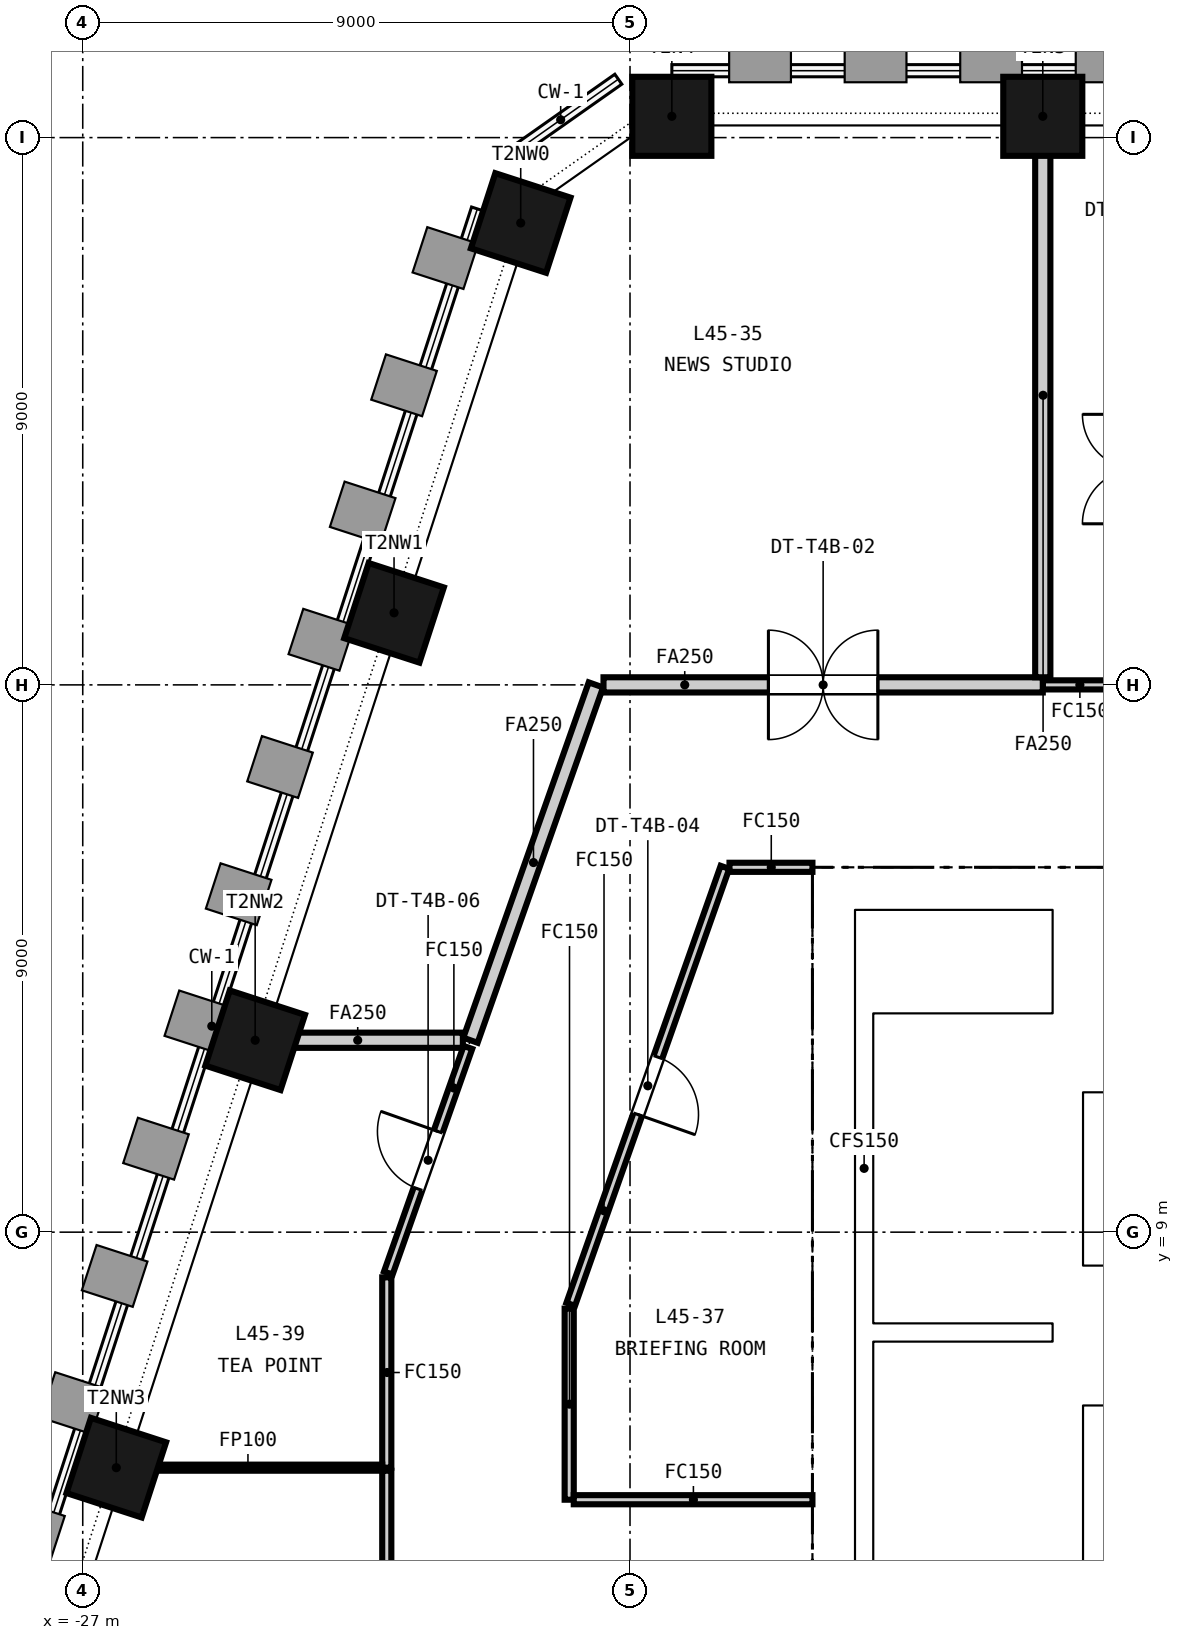
"""IFC4 building model, lengths in metres.
Left out: names, types, materials, properties, quantities, classifications, styles, units other than length and angle.
Written with IfcOpenShell. Run it as: python <this file> out.ifc"""

import sys

from ifc_helpers import new_model, si_unit, direction, frame, frame_2d, origin, origin_2d, place, context, subcontext, project, spatial, rectangle, extrude, element, fill, save


model = new_model("IFC4")
c1 = context("Model", 3, precision=1e-05, world=origin(), true_north=direction((0.0, 1.0)))
c2 = subcontext(c1, "Body", "Model", "MODEL_VIEW")
j1 = project(units=[si_unit("LENGTHUNIT", "METRE"), si_unit("PLANEANGLEUNIT", "RADIAN")], contexts=[c1])
p1 = place(None, origin())
s1 = spatial("IfcSite", under=j1, at=p1, CompositionType="ELEMENT")
p2 = place(p1, origin())
s2 = spatial("IfcBuilding", under=s1, at=p2, CompositionType="ELEMENT")
p3 = place(p2, frame((0.0, 0.0, 181.75)))
s3 = spatial("IfcBuildingStorey", under=s2, at=p3, CompositionType="ELEMENT", Elevation=181.75)
p4 = place(p3, frame((-15.0, 14.65, -0.15), z_axis=(0.0, 0.0, 1.0), x_axis=(1.0, 0.0, 0.0)))
e1 = element("IfcWall", 1, at=p4, inside=s3, PredefinedType="SOLIDWALL", context=c2, shape_type="SweptSolid", body=[
    extrude(rectangle(XDim=30.0, YDim=0.7, at=frame_2d((15.0, 0.0))), origin(), (0.0, 0.0, 1.0), 3.65),
])
p5 = place(p4, frame((9.25, 0.0, 0.15)))
e2 = element("IfcOpeningElement", 2, at=p5, cuts=e1, PredefinedType="OPENING", context=c2, shape_type="SweptSolid", body=[
    extrude(rectangle(XDim=1.5, YDim=2.1, at=frame_2d((0.75, 1.05))), frame((0.0, 0.36, 0.0), z_axis=(0.0, -1.0, 0.0), x_axis=(1.0, 0.0, 0.0)), (0.0, 0.0, 1.0), 0.72),
])
p6 = place(p4, frame((19.4, 0.0, 0.15)))
e3 = element("IfcOpeningElement", 3, at=p6, cuts=e1, PredefinedType="OPENING", context=c2, shape_type="SweptSolid", body=[
    extrude(rectangle(XDim=1.5, YDim=2.1, at=frame_2d((0.75, 1.05))), frame((0.0, 0.36, 0.0), z_axis=(0.0, -1.0, 0.0), x_axis=(1.0, 0.0, 0.0)), (0.0, 0.0, 1.0), 0.72),
])
p7 = place(p4, frame((1.5, 0.0, 0.15)))
e4 = element("IfcOpeningElement", 4, at=p7, cuts=e1, PredefinedType="OPENING", context=c2, shape_type="SweptSolid", body=[
    extrude(rectangle(XDim=1.2, YDim=2.1, at=frame_2d((0.6, 1.05))), frame((0.0, 0.36, 0.0), z_axis=(0.0, -1.0, 0.0), x_axis=(1.0, 0.0, 0.0)), (0.0, 0.0, 1.0), 0.72),
])
p8 = place(p4, frame((27.3, 0.0, 0.15)))
e5 = element("IfcOpeningElement", 5, at=p8, cuts=e1, PredefinedType="OPENING", context=c2, shape_type="SweptSolid", body=[
    extrude(rectangle(XDim=1.2, YDim=2.1, at=frame_2d((0.6, 1.05))), frame((0.0, 0.36, 0.0), z_axis=(0.0, -1.0, 0.0), x_axis=(1.0, 0.0, 0.0)), (0.0, 0.0, 1.0), 0.72),
])
p9 = place(p3, frame((-14.65, 0.7, -0.15), z_axis=(0.0, 0.0, 1.0), x_axis=(0.0, 1.0, 0.0)))
e6 = element("IfcWall", 6, at=p9, inside=s3, PredefinedType="SOLIDWALL", context=c2, shape_type="SweptSolid", body=[
    extrude(rectangle(XDim=13.6, YDim=0.7, at=frame_2d((6.8, 0.0))), origin(), (0.0, 0.0, 1.0), 3.65),
])
p10 = place(p3, frame((-10.8, 0.7, -0.15), z_axis=(0.0, 0.0, 1.0), x_axis=(0.0, 1.0, 0.0)))
e7 = element("IfcWall", 7, at=p10, inside=s3, PredefinedType="SOLIDWALL", context=c2, shape_type="SweptSolid", body=[
    extrude(rectangle(XDim=13.6, YDim=0.5, at=frame_2d((6.8, 0.0))), origin(), (0.0, 0.0, 1.0), 3.65),
])
for number, where, z_axis, x_axis in (
    (8, (-11.212, 27.35, -0.15), (0.0, 0.0, 1.0), (-1.0, 0.0, 0.0)),
    (9, (-17.312, 27.35, -0.15), (0.0, 0.0, 1.0), (-1.0, 0.0, 0.0)),
    (10, (-19.798, 25.596, -0.15), (0.0, 0.0, 1.0), (-0.309, -0.951, 0.0)),
    (11, (-21.881, 19.185, -0.15), (0.0, 0.0, 1.0), (-0.309, -0.951, 0.0)),
    (12, (-24.164, 12.156, -0.15), (0.0, 0.0, 1.0), (-0.309, -0.951, 0.0)),
    (13, (-26.448, 5.127, -0.15), (0.0, 0.0, 1.0), (-0.309, -0.951, 0.0)),
):
    element("IfcColumn", number, at=place(p3, frame(where, z_axis=z_axis, x_axis=x_axis)), inside=s3, PredefinedType="COLUMN", context=c2, shape_type="SweptSolid", body=[
        extrude(rectangle(XDim=1.3, YDim=1.3, at=origin_2d()), origin(), (0.0, 0.0, 1.0), 3.65),
    ])
p11 = place(p3, frame((-10.55, 6.025, 0.0), z_axis=(0.0, 0.0, 1.0), x_axis=(1.0, 0.0, 0.0)))
e14 = element("IfcWall", 14, at=p11, inside=s3, PredefinedType="PARTITIONING", context=c2, shape_type="SweptSolid", body=[
    extrude(rectangle(XDim=21.1, YDim=0.25, at=frame_2d((10.55, 0.0))), origin(), (0.0, 0.0, 1.0), 3.5),
])
p12 = place(p3, frame((-10.55, 8.55, 0.0), z_axis=(0.0, 0.0, 1.0), x_axis=(1.0, 0.0, 0.0)))
e15 = element("IfcWall", 15, at=p12, inside=s3, PredefinedType="PARTITIONING", context=c2, shape_type="SweptSolid", body=[
    extrude(rectangle(XDim=21.1, YDim=0.2, at=frame_2d((10.55, 0.0))), origin(), (0.0, 0.0, 1.0), 3.5),
])
p13 = place(p12, frame((0.675, 0.0, 0.0)))
e16 = element("IfcOpeningElement", 16, at=p13, cuts=e15, PredefinedType="OPENING", context=c2, shape_type="SweptSolid", body=[
    extrude(rectangle(XDim=1.2, YDim=2.1, at=frame_2d((0.6, 1.05))), frame((0.0, 0.11, 0.0), z_axis=(0.0, -1.0, 0.0), x_axis=(1.0, 0.0, 0.0)), (0.0, 0.0, 1.0), 0.22),
])
p14 = place(p12, frame((3.475, 0.0, 0.0)))
e17 = element("IfcOpeningElement", 17, at=p14, cuts=e15, PredefinedType="OPENING", context=c2, shape_type="SweptSolid", body=[
    extrude(rectangle(XDim=1.2, YDim=2.1, at=frame_2d((0.6, 1.05))), frame((0.0, 0.11, 0.0), z_axis=(0.0, -1.0, 0.0), x_axis=(1.0, 0.0, 0.0)), (0.0, 0.0, 1.0), 0.22),
])
p15 = place(p12, frame((6.275, 0.0, 0.0)))
e18 = element("IfcOpeningElement", 18, at=p15, cuts=e15, PredefinedType="OPENING", context=c2, shape_type="SweptSolid", body=[
    extrude(rectangle(XDim=1.2, YDim=2.1, at=frame_2d((0.6, 1.05))), frame((0.0, 0.11, 0.0), z_axis=(0.0, -1.0, 0.0), x_axis=(1.0, 0.0, 0.0)), (0.0, 0.0, 1.0), 0.22),
])
p16 = place(p12, frame((9.075, 0.0, 0.0)))
e19 = element("IfcOpeningElement", 19, at=p16, cuts=e15, PredefinedType="OPENING", context=c2, shape_type="SweptSolid", body=[
    extrude(rectangle(XDim=1.2, YDim=2.1, at=frame_2d((0.6, 1.05))), frame((0.0, 0.11, 0.0), z_axis=(0.0, -1.0, 0.0), x_axis=(1.0, 0.0, 0.0)), (0.0, 0.0, 1.0), 0.22),
])
p17 = place(p12, frame((11.875, 0.0, 0.0)))
e20 = element("IfcOpeningElement", 20, at=p17, cuts=e15, PredefinedType="OPENING", context=c2, shape_type="SweptSolid", body=[
    extrude(rectangle(XDim=1.2, YDim=2.1, at=frame_2d((0.6, 1.05))), frame((0.0, 0.11, 0.0), z_axis=(0.0, -1.0, 0.0), x_axis=(1.0, 0.0, 0.0)), (0.0, 0.0, 1.0), 0.22),
])
p18 = place(p12, frame((14.675, 0.0, 0.0)))
e21 = element("IfcOpeningElement", 21, at=p18, cuts=e15, PredefinedType="OPENING", context=c2, shape_type="SweptSolid", body=[
    extrude(rectangle(XDim=1.2, YDim=2.1, at=frame_2d((0.6, 1.05))), frame((0.0, 0.11, 0.0), z_axis=(0.0, -1.0, 0.0), x_axis=(1.0, 0.0, 0.0)), (0.0, 0.0, 1.0), 0.22),
])
p19 = place(p12, frame((17.475, 0.0, 0.0)))
e22 = element("IfcOpeningElement", 22, at=p19, cuts=e15, PredefinedType="OPENING", context=c2, shape_type="SweptSolid", body=[
    extrude(rectangle(XDim=1.2, YDim=2.1, at=frame_2d((0.6, 1.05))), frame((0.0, 0.11, 0.0), z_axis=(0.0, -1.0, 0.0), x_axis=(1.0, 0.0, 0.0)), (0.0, 0.0, 1.0), 0.22),
])
p20 = place(p12, frame((19.9, 0.0, 0.0)))
e23 = element("IfcOpeningElement", 23, at=p20, cuts=e15, PredefinedType="OPENING", context=c2, shape_type="SweptSolid", body=[
    extrude(rectangle(XDim=0.9, YDim=2.1, at=frame_2d((0.45, 1.05))), frame((0.0, 0.11, 0.0), z_axis=(0.0, -1.0, 0.0), x_axis=(1.0, 0.0, 0.0)), (0.0, 0.0, 1.0), 0.22),
])
p21 = place(p3, frame((-10.55, 11.2, 0.0), z_axis=(0.0, 0.0, 1.0), x_axis=(1.0, 0.0, 0.0)))
e24 = element("IfcWall", 24, at=p21, inside=s3, PredefinedType="PARTITIONING", context=c2, shape_type="SweptSolid", body=[
    extrude(rectangle(XDim=4.8, YDim=0.2, at=frame_2d((2.4, 0.0))), origin(), (0.0, 0.0, 1.0), 3.5),
])
p22 = place(p21, frame((0.525, 0.0, 0.0)))
e25 = element("IfcOpeningElement", 25, at=p22, cuts=e24, PredefinedType="OPENING", context=c2, shape_type="SweptSolid", body=[
    extrude(rectangle(XDim=1.1, YDim=2.1, at=frame_2d((0.55, 1.05))), frame((0.0, 0.11, 0.0), z_axis=(0.0, -1.0, 0.0), x_axis=(1.0, 0.0, 0.0)), (0.0, 0.0, 1.0), 0.22),
])
p23 = place(p21, frame((2.925, 0.0, 0.0)))
e26 = element("IfcOpeningElement", 26, at=p23, cuts=e24, PredefinedType="OPENING", context=c2, shape_type="SweptSolid", body=[
    extrude(rectangle(XDim=1.1, YDim=2.1, at=frame_2d((0.55, 1.05))), frame((0.0, 0.11, 0.0), z_axis=(0.0, -1.0, 0.0), x_axis=(1.0, 0.0, 0.0)), (0.0, 0.0, 1.0), 0.22),
])
p24 = place(p3, frame((-14.0, 7.35, 0.0), z_axis=(0.0, 0.0, 1.0), x_axis=(1.0, 0.0, 0.0)))
e27 = element("IfcWall", 27, at=p24, inside=s3, PredefinedType="SOLIDWALL", context=c2, shape_type="SweptSolid", body=[
    extrude(rectangle(XDim=2.95, YDim=0.3, at=frame_2d((1.475, 0.0))), origin(), (0.0, 0.0, 1.0), 3.5),
])
p25 = place(p3, frame((-14.15, 0.7, 0.0), z_axis=(0.0, 0.0, 1.0), x_axis=(0.0, 1.0, 0.0)))
e28 = element("IfcWall", 28, at=p25, inside=s3, PredefinedType="SOLIDWALL", context=c2, shape_type="SweptSolid", body=[
    extrude(rectangle(XDim=13.6, YDim=0.3, at=frame_2d((6.8, 0.0))), origin(), (0.0, 0.0, 1.0), 3.5),
])
p26 = place(p3, frame((-19.0, 7.743, 0.0), z_axis=(0.0, 0.0, 1.0), x_axis=(0.0, -1.0, 0.0)))
e29 = element("IfcWall", 29, at=p26, inside=s3, PredefinedType="PARTITIONING", context=c2, shape_type="SweptSolid", body=[
    extrude(rectangle(XDim=3.143, YDim=0.15, at=frame_2d((1.571, 0.0))), origin(), (0.0, 0.0, 1.0), 2.741),
])
p27 = place(p3, frame((-16.439, 15.0, 0.0), z_axis=(0.0, 0.0, 1.0), x_axis=(-0.332796656951, -0.942998613531, 0.0)))
e30 = element("IfcWall", 30, at=p27, inside=s3, PredefinedType="PARTITIONING", context=c2, shape_type="SweptSolid", body=[
    extrude(rectangle(XDim=7.621, YDim=0.15, at=frame_2d((3.81, 0.0))), origin(), (0.0, 0.0, 1.0), 2.741),
])
p28 = place(p27, frame((3.31, 0.0, 0.0)))
e31 = element("IfcOpeningElement", 31, at=p28, cuts=e30, PredefinedType="OPENING", context=c2, shape_type="SweptSolid", body=[
    extrude(rectangle(XDim=1.0, YDim=2.1, at=frame_2d((0.5, 1.05))), frame((0.0, 0.085, 0.0), z_axis=(0.0, -1.0, 0.0), x_axis=(1.0, 0.0, 0.0)), (0.0, 0.0, 1.0), 0.17),
])
p29 = place(p3, frame((-15.0, 15.0, 0.0), z_axis=(0.0, 0.0, 1.0), x_axis=(-1.0, 0.0, 0.0)))
e32 = element("IfcWall", 32, at=p29, inside=s3, PredefinedType="PARTITIONING", context=c2, shape_type="SweptSolid", body=[
    extrude(rectangle(XDim=1.364, YDim=0.15, at=frame_2d((0.682, 0.0))), origin(), (0.0, 0.0, 1.0), 2.741),
])
p30 = place(p3, frame((-11.212, 18.0, 0.0), z_axis=(0.0, 0.0, 1.0), x_axis=(1.0, 0.0, 0.0)))
e33 = element("IfcWall", 33, at=p30, inside=s3, PredefinedType="PARTITIONING", context=c2, shape_type="SweptSolid", body=[
    extrude(rectangle(XDim=1.21, YDim=0.15, at=frame_2d((0.605, 0.0))), origin(), (0.0, 0.0, 1.0), 2.741),
])
p31 = place(p3, frame((-20.624, 12.156, 0.0), z_axis=(0.0, 0.0, 1.0), x_axis=(0.332877813913, 0.942969968241, 0.0)))
e34 = element("IfcWall", 34, at=p31, inside=s3, PredefinedType="PARTITIONING", context=c2, shape_type="SweptSolid", body=[
    extrude(rectangle(XDim=6.198, YDim=0.25, at=frame_2d((3.099, 0.0))), origin(), (0.0, 0.0, 1.0), 2.741),
])
p32 = place(p3, frame((-18.436, 18.0, 0.0), z_axis=(0.0, 0.0, 1.0), x_axis=(1.0, 0.0, 0.0)))
e35 = element("IfcWall", 35, at=p32, inside=s3, PredefinedType="PARTITIONING", context=c2, shape_type="SweptSolid", body=[
    extrude(rectangle(XDim=7.224, YDim=0.25, at=frame_2d((3.612, 0.0))), origin(), (0.0, 0.0, 1.0), 2.741),
])
p33 = place(p32, frame((2.712, 0.0, 0.0)))
e36 = element("IfcOpeningElement", 36, at=p33, cuts=e35, PredefinedType="OPENING", context=c2, shape_type="SweptSolid", body=[
    extrude(rectangle(XDim=1.8, YDim=2.1, at=frame_2d((0.9, 1.05))), frame((0.0, 0.135, 0.0), z_axis=(0.0, -1.0, 0.0), x_axis=(1.0, 0.0, 0.0)), (0.0, 0.0, 1.0), 0.27),
])
p34 = place(p3, frame((-11.212, 18.125, 0.0), z_axis=(0.0, 0.0, 1.0), x_axis=(0.0, 1.0, 0.0)))
e37 = element("IfcWall", 37, at=p34, inside=s3, PredefinedType="PARTITIONING", context=c2, shape_type="SweptSolid", body=[
    extrude(rectangle(XDim=9.275, YDim=0.25, at=frame_2d((4.637, 0.0))), origin(), (0.0, 0.0, 1.0), 2.741),
])
p35 = place(p3, frame((-24.217, 12.156, 0.0), z_axis=(0.0, 0.0, 1.0), x_axis=(1.0, 0.0, 0.0)))
e38 = element("IfcWall", 38, at=p35, inside=s3, PredefinedType="PARTITIONING", context=c2, shape_type="SweptSolid", body=[
    extrude(rectangle(XDim=3.468, YDim=0.25, at=frame_2d((1.734, 0.0))), origin(), (0.0, 0.0, 1.0), 2.741),
])
p36 = place(p3, frame((-18.925, 4.6, 0.0), z_axis=(0.0, 0.0, 1.0), x_axis=(1.0, 0.0, 0.0)))
e39 = element("IfcWall", 39, at=p36, inside=s3, PredefinedType="PARTITIONING", context=c2, shape_type="SweptSolid", body=[
    extrude(rectangle(XDim=3.925, YDim=0.15, at=frame_2d((1.962, 0.0))), origin(), (0.0, 0.0, 1.0), 2.741),
])
p37 = place(p3, frame((-22.0, 5.127, 0.0), z_axis=(0.0, 0.0, 1.0), x_axis=(0.0, 1.0, 0.0)))
e40 = element("IfcWall", 40, at=p37, inside=s3, PredefinedType="PARTITIONING", context=c2, shape_type="SweptSolid", body=[
    extrude(rectangle(XDim=3.13, YDim=0.15, at=frame_2d((1.565, 0.0))), origin(), (0.0, 0.0, 1.0), 2.741),
])
p38 = place(p3, frame((-21.975, 8.328, 0.0), z_axis=(0.0, 0.0, 1.0), x_axis=(0.332820117735, 0.942990333583, 0.0)))
e41 = element("IfcWall", 41, at=p38, inside=s3, PredefinedType="PARTITIONING", context=c2, shape_type="SweptSolid", body=[
    extrude(rectangle(XDim=3.935, YDim=0.15, at=frame_2d((1.967, 0.0))), origin(), (0.0, 0.0, 1.0), 2.741),
])
p39 = place(p38, frame((1.467, 0.0, 0.0)))
e42 = element("IfcOpeningElement", 42, at=p39, cuts=e41, PredefinedType="OPENING", context=c2, shape_type="SweptSolid", body=[
    extrude(rectangle(XDim=1.0, YDim=2.1, at=frame_2d((0.5, 1.05))), frame((0.0, 0.085, 0.0), z_axis=(0.0, -1.0, 0.0), x_axis=(1.0, 0.0, 0.0)), (0.0, 0.0, 1.0), 0.17),
])
p40 = place(p3, frame((-26.501, 5.127, 0.0), z_axis=(0.0, 0.0, 1.0), x_axis=(1.0, 0.0, 0.0)))
e43 = element("IfcWall", 43, at=p40, inside=s3, PredefinedType="PARTITIONING", context=c2, shape_type="SweptSolid", body=[
    extrude(rectangle(XDim=4.426, YDim=0.1, at=frame_2d((2.213, 0.0))), origin(), (0.0, 0.0, 1.0), 2.741),
])
p41 = place(p3, frame((-22.0, 0.0, 0.0), z_axis=(0.0, 0.0, 1.0), x_axis=(0.0, 1.0, 0.0)))
e44 = element("IfcWall", 44, at=p41, inside=s3, PredefinedType="PARTITIONING", context=c2, shape_type="SweptSolid", body=[
    extrude(rectangle(XDim=5.077, YDim=0.15, at=frame_2d((2.539, 0.0))), origin(), (0.0, 0.0, 1.0), 2.741),
])
p42 = place(p7, origin())
e45 = element("IfcDoor", 45, at=p42, inside=s3, OperationType="SINGLE_SWING_RIGHT", PredefinedType="DOOR", context=c2, shape_type="SweptSolid", body=[
    extrude(rectangle(XDim=1.2, YDim=2.1, at=frame_2d((0.6, 1.05))), frame((0.0, 0.025, 0.0), z_axis=(0.0, -1.0, 0.0), x_axis=(1.0, 0.0, 0.0)), (0.0, 0.0, 1.0), 0.05),
])
fill(e4, e45)
p43 = place(p33, origin())
e46 = element("IfcDoor", 46, at=p43, inside=s3, OperationType="DOUBLE_DOOR_DOUBLE_SWING", PredefinedType="DOOR", context=c2, shape_type="SweptSolid", body=[
    extrude(rectangle(XDim=1.8, YDim=2.1, at=frame_2d((0.9, 1.05))), frame((0.0, 0.025, 0.0), z_axis=(0.0, -1.0, 0.0), x_axis=(1.0, 0.0, 0.0)), (0.0, 0.0, 1.0), 0.05),
])
fill(e36, e46)
p44 = place(p28, origin())
e47 = element("IfcDoor", 47, at=p44, inside=s3, OperationType="SINGLE_SWING_RIGHT", PredefinedType="DOOR", context=c2, shape_type="SweptSolid", body=[
    extrude(rectangle(XDim=1.0, YDim=2.1, at=frame_2d((0.5, 1.05))), frame((0.0, 0.025, 0.0), z_axis=(0.0, -1.0, 0.0), x_axis=(1.0, 0.0, 0.0)), (0.0, 0.0, 1.0), 0.05),
])
fill(e31, e47)
p45 = place(p39, origin())
e48 = element("IfcDoor", 48, at=p45, inside=s3, OperationType="SINGLE_SWING_RIGHT", PredefinedType="DOOR", context=c2, shape_type="SweptSolid", body=[
    extrude(rectangle(XDim=1.0, YDim=2.1, at=frame_2d((0.5, 1.05))), frame((0.0, 0.025, 0.0), z_axis=(0.0, -1.0, 0.0), x_axis=(1.0, 0.0, 0.0)), (0.0, 0.0, 1.0), 0.05),
])
fill(e42, e48)
save(model, sys.argv[1])
